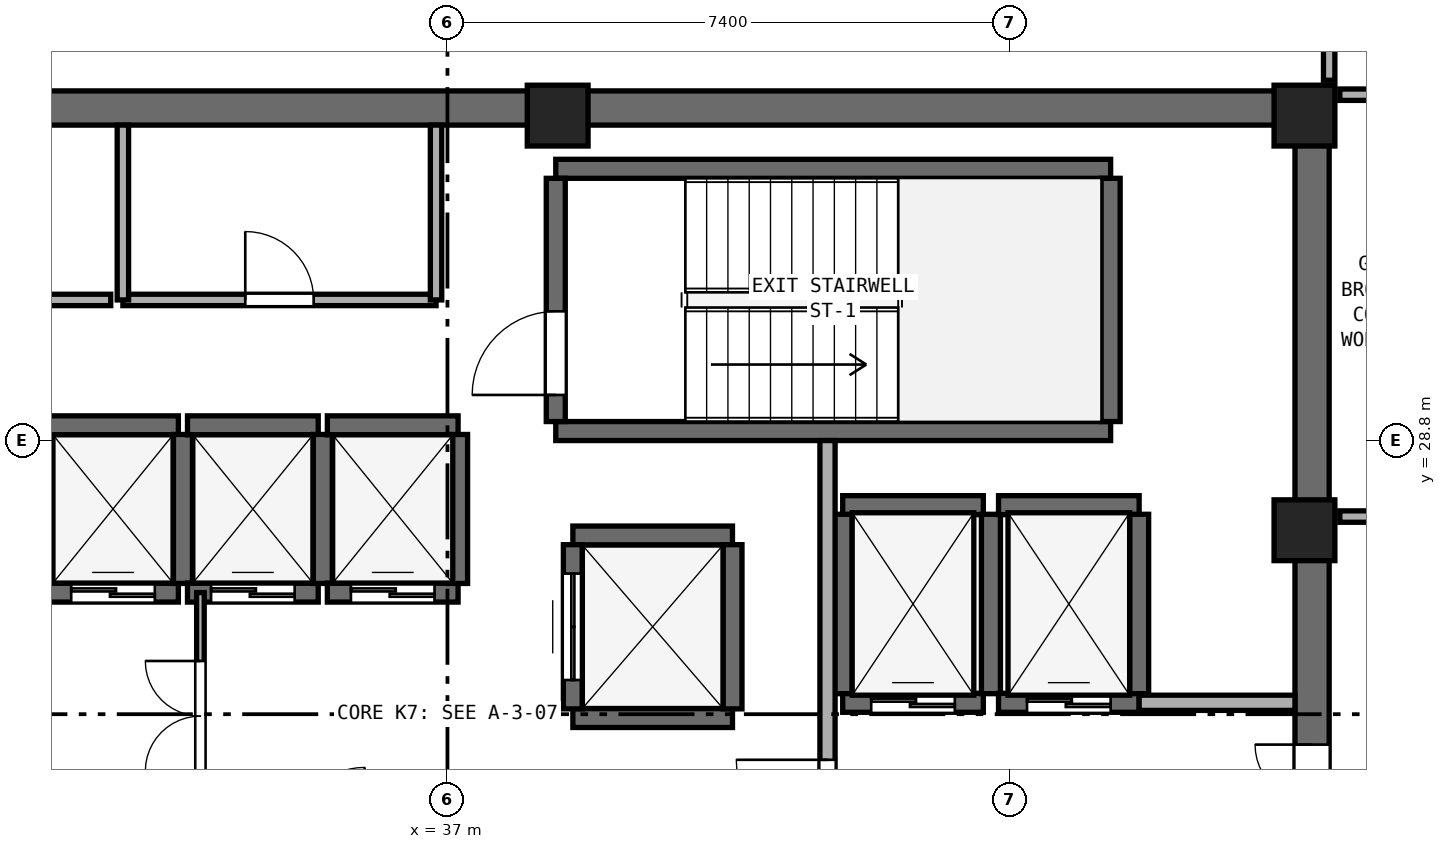
"""IFC4 building model, lengths in metres.
Left out: names, types, materials, properties, quantities, classifications, styles, units other than length and angle.
Written with IfcOpenShell. Run it as: python <this file> out.ifc"""

import sys

from ifc_helpers import new_model, si_unit, direction, frame, frame_2d, origin, origin_2d, place, context, subcontext, project, spatial, rectangle, extrude, element, fill, save


model = new_model("IFC4")
c1 = context("Model", 3, precision=1e-05, world=origin(), true_north=direction((0.0, 1.0)))
c2 = subcontext(c1, "Body", "Model", "MODEL_VIEW")
j1 = project(units=[si_unit("LENGTHUNIT", "METRE"), si_unit("PLANEANGLEUNIT", "RADIAN")], contexts=[c1])
p1 = place(None, origin())
s1 = spatial("IfcSite", under=j1, at=p1, CompositionType="ELEMENT")
p2 = place(p1, origin())
s2 = spatial("IfcBuilding", under=s1, at=p2, CompositionType="ELEMENT")
p3 = place(p2, frame((0.0, 0.0, 244.0)))
s3 = spatial("IfcBuildingStorey", under=s2, at=p3, CompositionType="ELEMENT", Elevation=244.0)
p4 = place(p3, frame((25.4, 33.175, 0.0), z_axis=(0.0, 0.0, 1.0), x_axis=(1.0, 0.0, 0.0)))
e1 = element("IfcWall", 1, at=p4, inside=s3, PredefinedType="SHEAR", context=c2, shape_type="SweptSolid", body=[
    extrude(rectangle(XDim=23.2, YDim=0.45, at=frame_2d((11.6, 0.0))), origin(), (0.0, 0.0, 1.0), 3.51),
])
p5 = place(p3, frame((48.375, 17.45, 0.0), z_axis=(0.0, 0.0, 1.0), x_axis=(0.0, 1.0, 0.0)))
e2 = element("IfcWall", 2, at=p5, inside=s3, PredefinedType="SHEAR", context=c2, shape_type="SweptSolid", body=[
    extrude(rectangle(XDim=15.5, YDim=0.45, at=frame_2d((7.75, 0.0))), origin(), (0.0, 0.0, 1.0), 3.51),
])
p6 = place(p5, frame((5.85, 0.0, 0.0)))
e3 = element("IfcOpeningElement", 3, at=p6, cuts=e2, PredefinedType="OPENING", context=c2, shape_type="SweptSolid", body=[
    extrude(rectangle(XDim=1.5, YDim=2.15, at=frame_2d((0.75, 1.075))), frame((0.0, 0.235, 0.0), z_axis=(0.0, -1.0, 0.0), x_axis=(1.0, 0.0, 0.0)), (0.0, 0.0, 1.0), 0.47),
])
for number, where, z_axis, x_axis in (
    (4, (48.275, 27.62, 0.0), (0.0, 0.0, 1.0), (1.0, 0.0, 0.0)),
    (5, (48.275, 33.075, 0.0), (0.0, 0.0, 1.0), (1.0, 0.0, 0.0)),
    (6, (38.45, 33.075, 0.0), (0.0, 0.0, 1.0), (1.0, 0.0, 0.0)),
):
    element("IfcColumn", number, at=place(p3, frame(where, z_axis=z_axis, x_axis=x_axis)), inside=s3, PredefinedType="PILASTER", context=c2, shape_type="SweptSolid", body=[
        extrude(rectangle(XDim=0.8, YDim=0.8, at=origin_2d()), origin(), (0.0, 0.0, 1.0), 3.8),
    ])
for number, where, z_axis, x_axis in (
    (7, (38.425, 28.925, 0.0), (0.0, 0.0, 1.0), (1.0, 0.0, 0.0)),
    (8, (38.425, 32.375, 0.0), (0.0, 0.0, 1.0), (1.0, 0.0, 0.0)),
):
    element("IfcWall", number, at=place(p3, frame(where, z_axis=z_axis, x_axis=x_axis)), inside=s3, PredefinedType="SHEAR", context=c2, shape_type="SweptSolid", body=[
        extrude(rectangle(XDim=7.3, YDim=0.25, at=frame_2d((3.65, 0.0))), origin(), (0.0, 0.0, 1.0), 3.51),
    ])
p7 = place(p3, frame((38.425, 29.05, 0.0), z_axis=(0.0, 0.0, 1.0), x_axis=(0.0, 1.0, 0.0)))
e9 = element("IfcWall", 9, at=p7, inside=s3, PredefinedType="SHEAR", context=c2, shape_type="SweptSolid", body=[
    extrude(rectangle(XDim=3.2, YDim=0.25, at=frame_2d((1.6, 0.0))), origin(), (0.0, 0.0, 1.0), 3.51),
])
p8 = place(p7, frame((0.35, 0.0, 0.0)))
e10 = element("IfcOpeningElement", 10, at=p8, cuts=e9, PredefinedType="OPENING", context=c2, shape_type="SweptSolid", body=[
    extrude(rectangle(XDim=1.1, YDim=2.15, at=frame_2d((0.55, 1.075))), frame((0.0, 0.135, 0.0), z_axis=(0.0, -1.0, 0.0), x_axis=(1.0, 0.0, 0.0)), (0.0, 0.0, 1.0), 0.27),
])
p9 = place(p3, frame((45.725, 29.05, 0.0), z_axis=(0.0, 0.0, 1.0), x_axis=(0.0, 1.0, 0.0)))
e11 = element("IfcWall", 11, at=p9, inside=s3, PredefinedType="SHEAR", context=c2, shape_type="SweptSolid", body=[
    extrude(rectangle(XDim=3.2, YDim=0.25, at=frame_2d((1.6, 0.0))), origin(), (0.0, 0.0, 1.0), 3.51),
])
p10 = place(p3, frame((31.74, 26.8, 0.0), z_axis=(0.0, 0.0, 1.0), x_axis=(1.0, 0.0, 0.0)))
e12 = element("IfcWall", 12, at=p10, inside=s3, PredefinedType="SHEAR", context=c2, shape_type="SweptSolid", body=[
    extrude(rectangle(XDim=1.72, YDim=0.25, at=frame_2d((0.86, 0.0))), origin(), (0.0, 0.0, 1.0), 3.51),
])
p11 = place(p10, frame((0.31, 0.0, 0.0)))
e13 = element("IfcOpeningElement", 13, at=p11, cuts=e12, PredefinedType="OPENING", context=c2, shape_type="SweptSolid", body=[
    extrude(rectangle(XDim=1.1, YDim=2.15, at=frame_2d((0.55, 1.075))), frame((0.0, 0.135, 0.0), z_axis=(0.0, -1.0, 0.0), x_axis=(1.0, 0.0, 0.0)), (0.0, 0.0, 1.0), 0.27),
])
p12 = place(p3, frame((31.74, 29.0, 0.0), z_axis=(0.0, 0.0, 1.0), x_axis=(1.0, 0.0, 0.0)))
e14 = element("IfcWall", 14, at=p12, inside=s3, PredefinedType="SHEAR", context=c2, shape_type="SweptSolid", body=[
    extrude(rectangle(XDim=1.72, YDim=0.25, at=frame_2d((0.86, 0.0))), origin(), (0.0, 0.0, 1.0), 3.51),
])
p13 = place(p3, frame((33.52, 26.92, 0.0), z_axis=(0.0, 0.0, 1.0), x_axis=(0.0, 1.0, 0.0)))
e15 = element("IfcWall", 15, at=p13, inside=s3, PredefinedType="SHEAR", context=c2, shape_type="SweptSolid", body=[
    extrude(rectangle(XDim=1.96, YDim=0.25, at=frame_2d((0.98, 0.0))), origin(), (0.0, 0.0, 1.0), 3.51),
])
p14 = place(p3, frame((33.58, 26.8, 0.0), z_axis=(0.0, 0.0, 1.0), x_axis=(1.0, 0.0, 0.0)))
e16 = element("IfcWall", 16, at=p14, inside=s3, PredefinedType="SHEAR", context=c2, shape_type="SweptSolid", body=[
    extrude(rectangle(XDim=1.72, YDim=0.25, at=frame_2d((0.86, 0.0))), origin(), (0.0, 0.0, 1.0), 3.51),
])
p15 = place(p14, frame((0.31, 0.0, 0.0)))
e17 = element("IfcOpeningElement", 17, at=p15, cuts=e16, PredefinedType="OPENING", context=c2, shape_type="SweptSolid", body=[
    extrude(rectangle(XDim=1.1, YDim=2.15, at=frame_2d((0.55, 1.075))), frame((0.0, 0.135, 0.0), z_axis=(0.0, -1.0, 0.0), x_axis=(1.0, 0.0, 0.0)), (0.0, 0.0, 1.0), 0.27),
])
p16 = place(p3, frame((33.58, 29.0, 0.0), z_axis=(0.0, 0.0, 1.0), x_axis=(1.0, 0.0, 0.0)))
e18 = element("IfcWall", 18, at=p16, inside=s3, PredefinedType="SHEAR", context=c2, shape_type="SweptSolid", body=[
    extrude(rectangle(XDim=1.72, YDim=0.25, at=frame_2d((0.86, 0.0))), origin(), (0.0, 0.0, 1.0), 3.51),
])
p17 = place(p3, frame((35.36, 26.92, 0.0), z_axis=(0.0, 0.0, 1.0), x_axis=(0.0, 1.0, 0.0)))
e19 = element("IfcWall", 19, at=p17, inside=s3, PredefinedType="SHEAR", context=c2, shape_type="SweptSolid", body=[
    extrude(rectangle(XDim=1.96, YDim=0.25, at=frame_2d((0.98, 0.0))), origin(), (0.0, 0.0, 1.0), 3.51),
])
p18 = place(p3, frame((35.42, 26.8, 0.0), z_axis=(0.0, 0.0, 1.0), x_axis=(1.0, 0.0, 0.0)))
e20 = element("IfcWall", 20, at=p18, inside=s3, PredefinedType="SHEAR", context=c2, shape_type="SweptSolid", body=[
    extrude(rectangle(XDim=1.72, YDim=0.25, at=frame_2d((0.86, 0.0))), origin(), (0.0, 0.0, 1.0), 3.51),
])
p19 = place(p18, frame((0.31, 0.0, 0.0)))
e21 = element("IfcOpeningElement", 21, at=p19, cuts=e20, PredefinedType="OPENING", context=c2, shape_type="SweptSolid", body=[
    extrude(rectangle(XDim=1.1, YDim=2.15, at=frame_2d((0.55, 1.075))), frame((0.0, 0.135, 0.0), z_axis=(0.0, -1.0, 0.0), x_axis=(1.0, 0.0, 0.0)), (0.0, 0.0, 1.0), 0.27),
])
p20 = place(p3, frame((35.42, 29.0, 0.0), z_axis=(0.0, 0.0, 1.0), x_axis=(1.0, 0.0, 0.0)))
e22 = element("IfcWall", 22, at=p20, inside=s3, PredefinedType="SHEAR", context=c2, shape_type="SweptSolid", body=[
    extrude(rectangle(XDim=1.72, YDim=0.25, at=frame_2d((0.86, 0.0))), origin(), (0.0, 0.0, 1.0), 3.51),
])
p21 = place(p3, frame((37.14, 26.92, 0.0), z_axis=(0.0, 0.0, 1.0), x_axis=(0.0, 1.0, 0.0)))
e23 = element("IfcWall", 23, at=p21, inside=s3, PredefinedType="SHEAR", context=c2, shape_type="SweptSolid", body=[
    extrude(rectangle(XDim=1.96, YDim=0.25, at=frame_2d((0.98, 0.0))), origin(), (0.0, 0.0, 1.0), 3.51),
])
p22 = place(p3, frame((42.2, 25.35, 0.0), z_axis=(0.0, 0.0, 1.0), x_axis=(1.0, 0.0, 0.0)))
e24 = element("IfcWall", 24, at=p22, inside=s3, PredefinedType="SHEAR", context=c2, shape_type="SweptSolid", body=[
    extrude(rectangle(XDim=1.85, YDim=0.25, at=frame_2d((0.925, 0.0))), origin(), (0.0, 0.0, 1.0), 3.51),
])
p23 = place(p22, frame((0.375, 0.0, 0.0)))
e25 = element("IfcOpeningElement", 25, at=p23, cuts=e24, PredefinedType="OPENING", context=c2, shape_type="SweptSolid", body=[
    extrude(rectangle(XDim=1.1, YDim=2.15, at=frame_2d((0.55, 1.075))), frame((0.0, 0.135, 0.0), z_axis=(0.0, -1.0, 0.0), x_axis=(1.0, 0.0, 0.0)), (0.0, 0.0, 1.0), 0.27),
])
p24 = place(p3, frame((42.2, 27.95, 0.0), z_axis=(0.0, 0.0, 1.0), x_axis=(1.0, 0.0, 0.0)))
e26 = element("IfcWall", 26, at=p24, inside=s3, PredefinedType="SHEAR", context=c2, shape_type="SweptSolid", body=[
    extrude(rectangle(XDim=1.85, YDim=0.25, at=frame_2d((0.925, 0.0))), origin(), (0.0, 0.0, 1.0), 3.51),
])
for number, where, z_axis, x_axis in (
    (27, (42.2, 25.47, 0.0), (0.0, 0.0, 1.0), (0.0, 1.0, 0.0)),
    (28, (44.15, 25.47, 0.0), (0.0, 0.0, 1.0), (0.0, 1.0, 0.0)),
):
    element("IfcWall", number, at=place(p3, frame(where, z_axis=z_axis, x_axis=x_axis)), inside=s3, PredefinedType="SHEAR", context=c2, shape_type="SweptSolid", body=[
        extrude(rectangle(XDim=2.36, YDim=0.25, at=frame_2d((1.18, 0.0))), origin(), (0.0, 0.0, 1.0), 3.51),
    ])
p25 = place(p3, frame((44.25, 25.35, 0.0), z_axis=(0.0, 0.0, 1.0), x_axis=(1.0, 0.0, 0.0)))
e29 = element("IfcWall", 29, at=p25, inside=s3, PredefinedType="SHEAR", context=c2, shape_type="SweptSolid", body=[
    extrude(rectangle(XDim=1.85, YDim=0.25, at=frame_2d((0.925, 0.0))), origin(), (0.0, 0.0, 1.0), 3.51),
])
p26 = place(p25, frame((0.375, 0.0, 0.0)))
e30 = element("IfcOpeningElement", 30, at=p26, cuts=e29, PredefinedType="OPENING", context=c2, shape_type="SweptSolid", body=[
    extrude(rectangle(XDim=1.1, YDim=2.15, at=frame_2d((0.55, 1.075))), frame((0.0, 0.135, 0.0), z_axis=(0.0, -1.0, 0.0), x_axis=(1.0, 0.0, 0.0)), (0.0, 0.0, 1.0), 0.27),
])
p27 = place(p3, frame((44.25, 27.95, 0.0), z_axis=(0.0, 0.0, 1.0), x_axis=(1.0, 0.0, 0.0)))
e31 = element("IfcWall", 31, at=p27, inside=s3, PredefinedType="SHEAR", context=c2, shape_type="SweptSolid", body=[
    extrude(rectangle(XDim=1.85, YDim=0.25, at=frame_2d((0.925, 0.0))), origin(), (0.0, 0.0, 1.0), 3.51),
])
p28 = place(p3, frame((46.1, 25.47, 0.0), z_axis=(0.0, 0.0, 1.0), x_axis=(0.0, 1.0, 0.0)))
e32 = element("IfcWall", 32, at=p28, inside=s3, PredefinedType="SHEAR", context=c2, shape_type="SweptSolid", body=[
    extrude(rectangle(XDim=2.36, YDim=0.25, at=frame_2d((1.18, 0.0))), origin(), (0.0, 0.0, 1.0), 3.51),
])
for number, where, z_axis, x_axis in (
    (33, (38.65, 25.15, 0.0), (0.0, 0.0, 1.0), (1.0, 0.0, 0.0)),
    (34, (38.65, 27.55, 0.0), (0.0, 0.0, 1.0), (1.0, 0.0, 0.0)),
):
    element("IfcWall", number, at=place(p3, frame(where, z_axis=z_axis, x_axis=x_axis)), inside=s3, PredefinedType="SHEAR", context=c2, shape_type="SweptSolid", body=[
        extrude(rectangle(XDim=2.1, YDim=0.25, at=frame_2d((1.05, 0.0))), origin(), (0.0, 0.0, 1.0), 3.51),
    ])
p29 = place(p3, frame((38.65, 25.27, 0.0), z_axis=(0.0, 0.0, 1.0), x_axis=(0.0, 1.0, 0.0)))
e35 = element("IfcWall", 35, at=p29, inside=s3, PredefinedType="SHEAR", context=c2, shape_type="SweptSolid", body=[
    extrude(rectangle(XDim=2.16, YDim=0.25, at=frame_2d((1.08, 0.0))), origin(), (0.0, 0.0, 1.0), 3.51),
])
p30 = place(p29, frame((0.38, 0.0, 0.0)))
e36 = element("IfcOpeningElement", 36, at=p30, cuts=e35, PredefinedType="OPENING", context=c2, shape_type="SweptSolid", body=[
    extrude(rectangle(XDim=1.4, YDim=2.2, at=frame_2d((0.7, 1.1))), frame((0.0, 0.135, 0.0), z_axis=(0.0, -1.0, 0.0), x_axis=(1.0, 0.0, 0.0)), (0.0, 0.0, 1.0), 0.27),
])
p31 = place(p3, frame((40.75, 25.27, 0.0), z_axis=(0.0, 0.0, 1.0), x_axis=(0.0, 1.0, 0.0)))
e37 = element("IfcWall", 37, at=p31, inside=s3, PredefinedType="SHEAR", context=c2, shape_type="SweptSolid", body=[
    extrude(rectangle(XDim=2.16, YDim=0.25, at=frame_2d((1.08, 0.0))), origin(), (0.0, 0.0, 1.0), 3.51),
])
p32 = place(p3, frame((42.0, 22.75, 0.0), z_axis=(0.0, 0.0, 1.0), x_axis=(0.0, 1.0, 0.0)))
e38 = element("IfcWall", 38, at=p32, inside=s3, PredefinedType="SOLIDWALL", context=c2, shape_type="SweptSolid", body=[
    extrude(rectangle(XDim=6.05, YDim=0.2, at=frame_2d((3.025, 0.0))), origin(), (0.0, 0.0, 1.0), 3.51),
])
p33 = place(p32, frame((0.65, 0.0, 0.0)))
e39 = element("IfcOpeningElement", 39, at=p33, cuts=e38, PredefinedType="OPENING", context=c2, shape_type="SweptSolid", body=[
    extrude(rectangle(XDim=1.2, YDim=2.15, at=frame_2d((0.6, 1.075))), frame((0.0, 0.11, 0.0), z_axis=(0.0, -1.0, 0.0), x_axis=(1.0, 0.0, 0.0)), (0.0, 0.0, 1.0), 0.22),
])
p34 = place(p3, frame((46.1, 25.35, 0.0), z_axis=(0.0, 0.0, 1.0), x_axis=(1.0, 0.0, 0.0)))
e40 = element("IfcWall", 40, at=p34, inside=s3, PredefinedType="SOLIDWALL", context=c2, shape_type="SweptSolid", body=[
    extrude(rectangle(XDim=2.05, YDim=0.2, at=frame_2d((1.025, 0.0))), origin(), (0.0, 0.0, 1.0), 3.51),
])
p35 = place(p3, frame((29.33, 30.65, 0.0), z_axis=(0.0, 0.0, 1.0), x_axis=(1.0, 0.0, 0.0)))
e41 = element("IfcWall", 41, at=p35, inside=s3, PredefinedType="PARTITIONING", context=c2, shape_type="SweptSolid", body=[
    extrude(rectangle(XDim=3.24, YDim=0.15, at=frame_2d((1.62, 0.0))), origin(), (0.0, 0.0, 1.0), 3.51),
])
p36 = place(p35, frame((1.145, 0.0, 0.0)))
e42 = element("IfcOpeningElement", 42, at=p36, cuts=e41, PredefinedType="OPENING", context=c2, shape_type="SweptSolid", body=[
    extrude(rectangle(XDim=0.95, YDim=2.1, at=frame_2d((0.475, 1.05))), frame((0.0, 0.085, 0.0), z_axis=(0.0, -1.0, 0.0), x_axis=(1.0, 0.0, 0.0)), (0.0, 0.0, 1.0), 0.17),
])
p37 = place(p3, frame((32.73, 30.65, 0.0), z_axis=(0.0, 0.0, 1.0), x_axis=(1.0, 0.0, 0.0)))
e43 = element("IfcWall", 43, at=p37, inside=s3, PredefinedType="PARTITIONING", context=c2, shape_type="SweptSolid", body=[
    extrude(rectangle(XDim=4.12, YDim=0.15, at=frame_2d((2.06, 0.0))), origin(), (0.0, 0.0, 1.0), 3.51),
])
p38 = place(p37, frame((1.61, 0.0, 0.0)))
e44 = element("IfcOpeningElement", 44, at=p38, cuts=e43, PredefinedType="OPENING", context=c2, shape_type="SweptSolid", body=[
    extrude(rectangle(XDim=0.9, YDim=2.1, at=frame_2d((0.45, 1.05))), frame((0.0, 0.085, 0.0), z_axis=(0.0, -1.0, 0.0), x_axis=(1.0, 0.0, 0.0)), (0.0, 0.0, 1.0), 0.17),
])
for number, where, z_axis, x_axis in (
    (45, (32.73, 30.65, 0.0), (0.0, 0.0, 1.0), (0.0, 1.0, 0.0)),
    (46, (36.85, 30.65, 0.0), (0.0, 0.0, 1.0), (0.0, 1.0, 0.0)),
):
    element("IfcWall", number, at=place(p3, frame(where, z_axis=z_axis, x_axis=x_axis)), inside=s3, PredefinedType="PARTITIONING", context=c2, shape_type="SweptSolid", body=[
        extrude(rectangle(XDim=2.3, YDim=0.15, at=frame_2d((1.15, 0.0))), origin(), (0.0, 0.0, 1.0), 3.51),
    ])
p39 = place(p3, frame((33.75, 23.6, 0.0), z_axis=(0.0, 0.0, 1.0), x_axis=(0.0, 1.0, 0.0)))
e47 = element("IfcWall", 47, at=p39, inside=s3, PredefinedType="PARTITIONING", context=c2, shape_type="SweptSolid", body=[
    extrude(rectangle(XDim=3.2, YDim=0.1, at=frame_2d((1.6, 0.0))), origin(), (0.0, 0.0, 1.0), 3.51),
])
p40 = place(p39, frame((0.85, 0.0, 0.0)))
e48 = element("IfcOpeningElement", 48, at=p40, cuts=e47, PredefinedType="OPENING", context=c2, shape_type="SweptSolid", body=[
    extrude(rectangle(XDim=1.45, YDim=2.12, at=frame_2d((0.725, 1.06))), frame((0.0, 0.06, 0.0), z_axis=(0.0, -1.0, 0.0), x_axis=(1.0, 0.0, 0.0)), (0.0, 0.0, 1.0), 0.12),
])
p41 = place(p3, frame((48.6, 33.54, 0.0), z_axis=(0.0, 0.0, 1.0), x_axis=(0.0, 1.0, 0.0)))
e49 = element("IfcWall", 49, at=p41, inside=s3, PredefinedType="PARTITIONING", context=c2, shape_type="SweptSolid", body=[
    extrude(rectangle(XDim=2.81, YDim=0.15, at=frame_2d((1.405, 0.0))), origin(), (0.0, 0.0, 1.0), 2.893),
])
p42 = place(p3, frame((48.74, 27.8, 0.0), z_axis=(0.0, 0.0, 1.0), x_axis=(1.0, 0.0, 0.0)))
e50 = element("IfcWall", 50, at=p42, inside=s3, PredefinedType="PARTITIONING", context=c2, shape_type="SweptSolid", body=[
    extrude(rectangle(XDim=2.81, YDim=0.15, at=frame_2d((1.405, 0.0))), origin(), (0.0, 0.0, 1.0), 3.51),
])
p43 = place(p3, frame((48.74, 33.35, 0.0), z_axis=(0.0, 0.0, 1.0), x_axis=(1.0, 0.0, 0.0)))
e51 = element("IfcWall", 51, at=p43, inside=s3, PredefinedType="PARTITIONING", context=c2, shape_type="SweptSolid", body=[
    extrude(rectangle(XDim=2.81, YDim=0.15, at=frame_2d((1.405, 0.0))), origin(), (0.0, 0.0, 1.0), 2.893),
])
p44 = place(p8, origin())
e52 = element("IfcDoor", 52, at=p44, inside=s3, OperationType="SINGLE_SWING_LEFT", PredefinedType="DOOR", context=c2, shape_type="SweptSolid", body=[
    extrude(rectangle(XDim=1.1, YDim=2.15, at=frame_2d((0.55, 1.075))), frame((0.0, 0.025, 0.0), z_axis=(0.0, -1.0, 0.0), x_axis=(1.0, 0.0, 0.0)), (0.0, 0.0, 1.0), 0.05),
])
fill(e10, e52)
p45 = place(p11, origin())
e53 = element("IfcDoor", 53, at=p45, inside=s3, OperationType="DOUBLE_DOOR_SLIDING", PredefinedType="DOOR", context=c2, shape_type="SweptSolid", body=[
    extrude(rectangle(XDim=1.1, YDim=2.15, at=frame_2d((0.55, 1.075))), frame((0.0, 0.025, 0.0), z_axis=(0.0, -1.0, 0.0), x_axis=(1.0, 0.0, 0.0)), (0.0, 0.0, 1.0), 0.05),
])
fill(e13, e53)
p46 = place(p15, origin())
e54 = element("IfcDoor", 54, at=p46, inside=s3, OperationType="DOUBLE_DOOR_SLIDING", PredefinedType="DOOR", context=c2, shape_type="SweptSolid", body=[
    extrude(rectangle(XDim=1.1, YDim=2.15, at=frame_2d((0.55, 1.075))), frame((0.0, 0.025, 0.0), z_axis=(0.0, -1.0, 0.0), x_axis=(1.0, 0.0, 0.0)), (0.0, 0.0, 1.0), 0.05),
])
fill(e17, e54)
p47 = place(p19, origin())
e55 = element("IfcDoor", 55, at=p47, inside=s3, OperationType="DOUBLE_DOOR_SLIDING", PredefinedType="DOOR", context=c2, shape_type="SweptSolid", body=[
    extrude(rectangle(XDim=1.1, YDim=2.15, at=frame_2d((0.55, 1.075))), frame((0.0, 0.025, 0.0), z_axis=(0.0, -1.0, 0.0), x_axis=(1.0, 0.0, 0.0)), (0.0, 0.0, 1.0), 0.05),
])
fill(e21, e55)
p48 = place(p23, origin())
e56 = element("IfcDoor", 56, at=p48, inside=s3, OperationType="DOUBLE_DOOR_SLIDING", PredefinedType="DOOR", context=c2, shape_type="SweptSolid", body=[
    extrude(rectangle(XDim=1.1, YDim=2.15, at=frame_2d((0.55, 1.075))), frame((0.0, 0.025, 0.0), z_axis=(0.0, -1.0, 0.0), x_axis=(1.0, 0.0, 0.0)), (0.0, 0.0, 1.0), 0.05),
])
fill(e25, e56)
p49 = place(p26, origin())
e57 = element("IfcDoor", 57, at=p49, inside=s3, OperationType="DOUBLE_DOOR_SLIDING", PredefinedType="DOOR", context=c2, shape_type="SweptSolid", body=[
    extrude(rectangle(XDim=1.1, YDim=2.15, at=frame_2d((0.55, 1.075))), frame((0.0, 0.025, 0.0), z_axis=(0.0, -1.0, 0.0), x_axis=(1.0, 0.0, 0.0)), (0.0, 0.0, 1.0), 0.05),
])
fill(e30, e57)
p50 = place(p30, origin())
e58 = element("IfcDoor", 58, at=p50, inside=s3, OperationType="DOUBLE_DOOR_SLIDING", PredefinedType="DOOR", context=c2, shape_type="SweptSolid", body=[
    extrude(rectangle(XDim=1.4, YDim=2.2, at=frame_2d((0.7, 1.1))), frame((0.0, 0.025, 0.0), z_axis=(0.0, -1.0, 0.0), x_axis=(1.0, 0.0, 0.0)), (0.0, 0.0, 1.0), 0.05),
])
fill(e36, e58)
p51 = place(p33, origin())
e59 = element("IfcDoor", 59, at=p51, inside=s3, OperationType="SINGLE_SWING_RIGHT", PredefinedType="DOOR", context=c2, shape_type="SweptSolid", body=[
    extrude(rectangle(XDim=1.2, YDim=2.15, at=frame_2d((0.6, 1.075))), frame((0.0, 0.025, 0.0), z_axis=(0.0, -1.0, 0.0), x_axis=(1.0, 0.0, 0.0)), (0.0, 0.0, 1.0), 0.05),
])
fill(e39, e59)
p52 = place(p6, origin())
e60 = element("IfcDoor", 60, at=p52, inside=s3, OperationType="DOUBLE_DOOR_SINGLE_SWING", PredefinedType="DOOR", context=c2, shape_type="SweptSolid", body=[
    extrude(rectangle(XDim=1.5, YDim=2.15, at=frame_2d((0.75, 1.075))), frame((0.0, 0.025, 0.0), z_axis=(0.0, -1.0, 0.0), x_axis=(1.0, 0.0, 0.0)), (0.0, 0.0, 1.0), 0.05),
])
fill(e3, e60)
p53 = place(p38, origin())
e61 = element("IfcDoor", 61, at=p53, inside=s3, OperationType="SINGLE_SWING_LEFT", PredefinedType="DOOR", context=c2, shape_type="SweptSolid", body=[
    extrude(rectangle(XDim=0.9, YDim=2.1, at=frame_2d((0.45, 1.05))), frame((0.0, 0.025, 0.0), z_axis=(0.0, -1.0, 0.0), x_axis=(1.0, 0.0, 0.0)), (0.0, 0.0, 1.0), 0.05),
])
fill(e44, e61)
p54 = place(p40, origin())
e62 = element("IfcDoor", 62, at=p54, inside=s3, OperationType="DOUBLE_DOOR_SINGLE_SWING", PredefinedType="DOOR", context=c2, shape_type="SweptSolid", body=[
    extrude(rectangle(XDim=1.45, YDim=2.12, at=frame_2d((0.725, 1.06))), frame((0.0, 0.025, 0.0), z_axis=(0.0, -1.0, 0.0), x_axis=(1.0, 0.0, 0.0)), (0.0, 0.0, 1.0), 0.05),
])
fill(e48, e62)
save(model, sys.argv[1])
